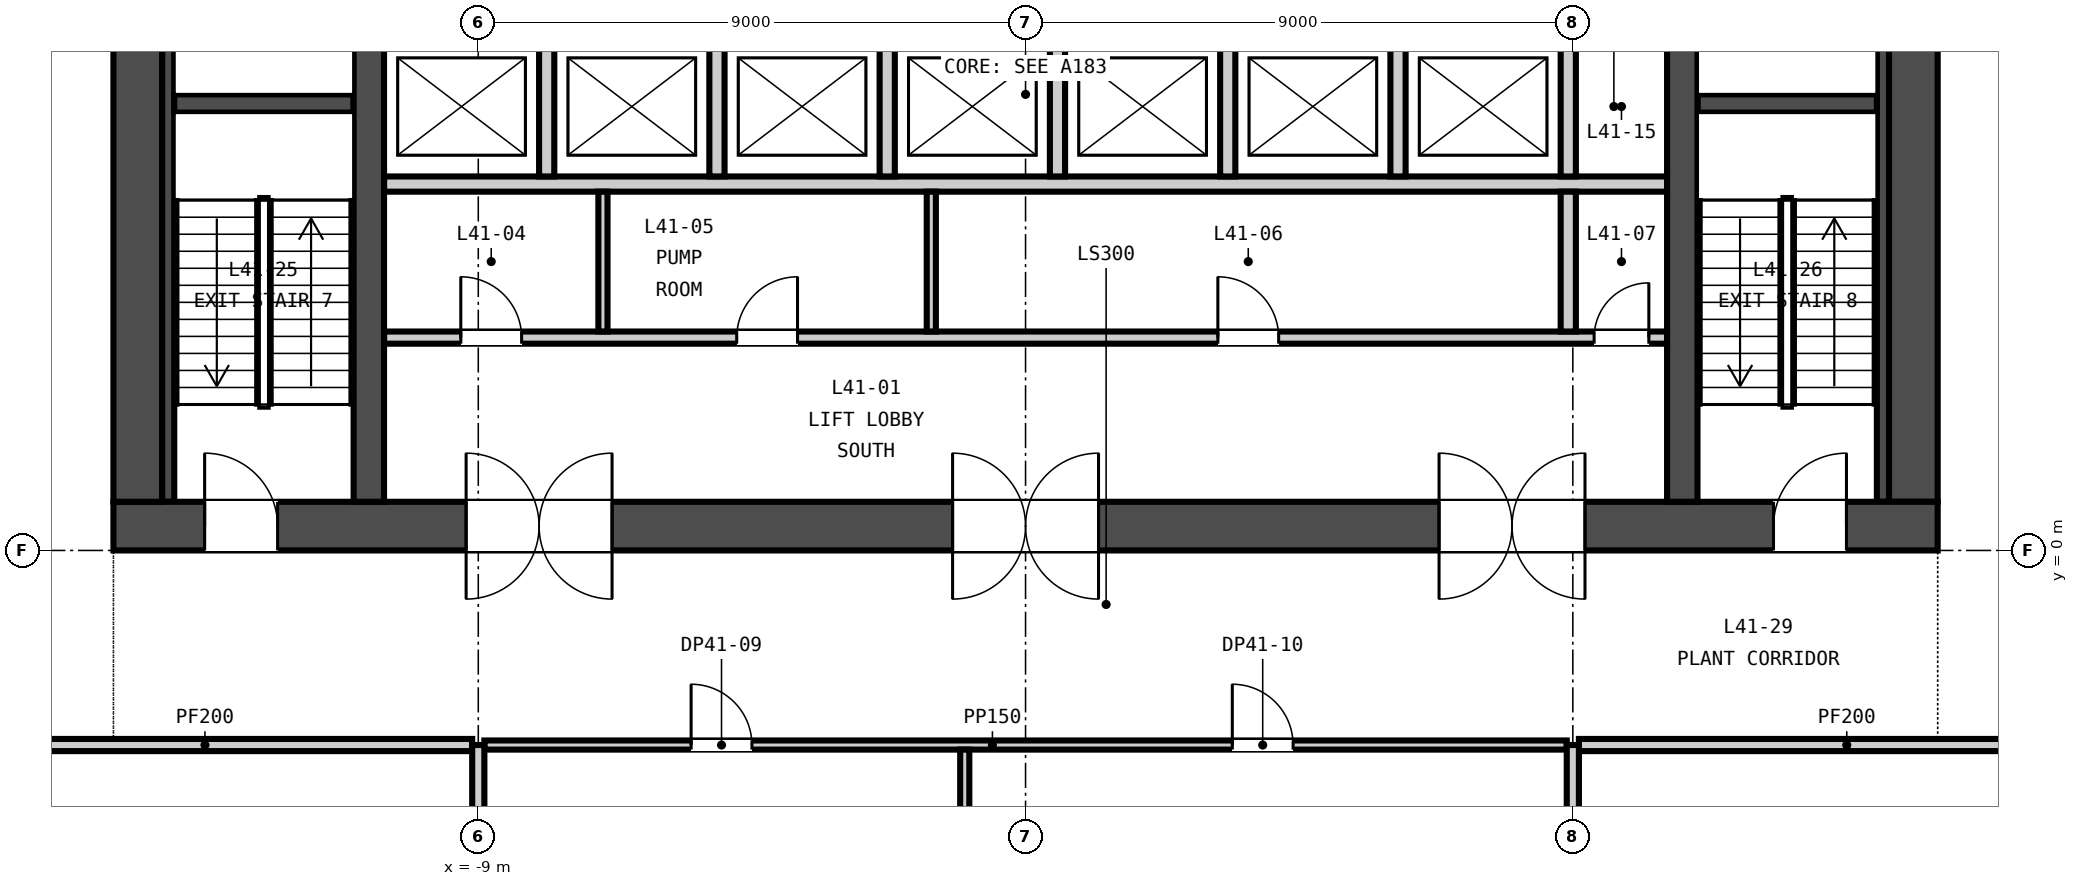
"""IFC4 building model, lengths in metres.
Left out: names, types, materials, properties, quantities, classifications, styles, units other than length and angle.
Written with IfcOpenShell. Run it as: python <this file> out.ifc"""

import sys

from ifc_helpers import new_model, si_unit, direction, frame, frame_2d, origin, place, context, subcontext, project, spatial, rectangle, extrude, element, fill, save


model = new_model("IFC4")
c1 = context("Model", 3, precision=1e-05, world=origin(), true_north=direction((0.0, 1.0)))
c2 = subcontext(c1, "Body", "Model", "MODEL_VIEW")
j1 = project(units=[si_unit("LENGTHUNIT", "METRE"), si_unit("PLANEANGLEUNIT", "RADIAN")], contexts=[c1])
p1 = place(None, origin())
s1 = spatial("IfcSite", under=j1, at=p1, CompositionType="ELEMENT")
p2 = place(p1, origin())
s2 = spatial("IfcBuilding", under=s1, at=p2, CompositionType="ELEMENT")
p3 = place(p2, frame((0.0, 0.0, 166.3)))
s3 = spatial("IfcBuildingStorey", under=s2, at=p3, CompositionType="ELEMENT", Elevation=166.3)
p4 = place(p3, frame((-15.0, 0.4, -0.3), z_axis=(0.0, 0.0, 1.0), x_axis=(1.0, 0.0, 0.0)))
e1 = element("IfcWall", 1, at=p4, inside=s3, PredefinedType="SOLIDWALL", context=c2, shape_type="SweptSolid", body=[
    extrude(rectangle(XDim=30.0, YDim=0.8, at=frame_2d((15.0, 0.0))), origin(), (0.0, 0.0, 1.0), 4.65),
])
p5 = place(p4, frame((5.8, 0.0, 0.3)))
e2 = element("IfcOpeningElement", 2, at=p5, cuts=e1, PredefinedType="OPENING", context=c2, shape_type="SweptSolid", body=[
    extrude(rectangle(XDim=2.4, YDim=2.4, at=frame_2d((1.2, 1.2))), frame((0.0, 0.41, 0.0), z_axis=(0.0, -1.0, 0.0), x_axis=(1.0, 0.0, 0.0)), (0.0, 0.0, 1.0), 0.82),
])
p6 = place(p4, frame((13.8, 0.0, 0.3)))
e3 = element("IfcOpeningElement", 3, at=p6, cuts=e1, PredefinedType="OPENING", context=c2, shape_type="SweptSolid", body=[
    extrude(rectangle(XDim=2.4, YDim=2.4, at=frame_2d((1.2, 1.2))), frame((0.0, 0.41, 0.0), z_axis=(0.0, -1.0, 0.0), x_axis=(1.0, 0.0, 0.0)), (0.0, 0.0, 1.0), 0.82),
])
p7 = place(p4, frame((21.8, 0.0, 0.3)))
e4 = element("IfcOpeningElement", 4, at=p7, cuts=e1, PredefinedType="OPENING", context=c2, shape_type="SweptSolid", body=[
    extrude(rectangle(XDim=2.4, YDim=2.4, at=frame_2d((1.2, 1.2))), frame((0.0, 0.41, 0.0), z_axis=(0.0, -1.0, 0.0), x_axis=(1.0, 0.0, 0.0)), (0.0, 0.0, 1.0), 0.82),
])
p8 = place(p4, frame((1.5, 0.0, 0.3)))
e5 = element("IfcOpeningElement", 5, at=p8, cuts=e1, PredefinedType="OPENING", context=c2, shape_type="SweptSolid", body=[
    extrude(rectangle(XDim=1.2, YDim=2.1, at=frame_2d((0.6, 1.05))), frame((0.0, 0.41, 0.0), z_axis=(0.0, -1.0, 0.0), x_axis=(1.0, 0.0, 0.0)), (0.0, 0.0, 1.0), 0.82),
])
p9 = place(p4, frame((27.3, 0.0, 0.3)))
e6 = element("IfcOpeningElement", 6, at=p9, cuts=e1, PredefinedType="OPENING", context=c2, shape_type="SweptSolid", body=[
    extrude(rectangle(XDim=1.2, YDim=2.1, at=frame_2d((0.6, 1.05))), frame((0.0, 0.41, 0.0), z_axis=(0.0, -1.0, 0.0), x_axis=(1.0, 0.0, 0.0)), (0.0, 0.0, 1.0), 0.82),
])
for number, where, z_axis, x_axis in (
    (7, (-14.6, 0.8, -0.3), (0.0, 0.0, 1.0), (0.0, 1.0, 0.0)),
    (8, (14.6, 0.8, -0.3), (0.0, 0.0, 1.0), (0.0, 1.0, 0.0)),
):
    element("IfcWall", number, at=place(p3, frame(where, z_axis=z_axis, x_axis=x_axis)), inside=s3, PredefinedType="SOLIDWALL", context=c2, shape_type="SweptSolid", body=[
        extrude(rectangle(XDim=13.4, YDim=0.8, at=frame_2d((6.7, 0.0))), origin(), (0.0, 0.0, 1.0), 4.65),
    ])
for number, where, z_axis, x_axis in (
    (9, (-10.8, 0.8, -0.3), (0.0, 0.0, 1.0), (0.0, 1.0, 0.0)),
    (10, (10.8, 0.8, -0.3), (0.0, 0.0, 1.0), (0.0, 1.0, 0.0)),
):
    element("IfcWall", number, at=place(p3, frame(where, z_axis=z_axis, x_axis=x_axis)), inside=s3, PredefinedType="SOLIDWALL", context=c2, shape_type="SweptSolid", body=[
        extrude(rectangle(XDim=13.4, YDim=0.5, at=frame_2d((6.7, 0.0))), origin(), (0.0, 0.0, 1.0), 4.65),
    ])
p10 = place(p3, frame((-10.55, 3.5, 0.0), z_axis=(0.0, 0.0, 1.0), x_axis=(1.0, 0.0, 0.0)))
e11 = element("IfcWall", 11, at=p10, inside=s3, PredefinedType="PARTITIONING", context=c2, shape_type="SweptSolid", body=[
    extrude(rectangle(XDim=21.1, YDim=0.2, at=frame_2d((10.55, 0.0))), origin(), (0.0, 0.0, 1.0), 4.35),
])
p11 = place(p10, frame((1.262, 0.0, 0.0)))
e12 = element("IfcOpeningElement", 12, at=p11, cuts=e11, PredefinedType="OPENING", context=c2, shape_type="SweptSolid", body=[
    extrude(rectangle(XDim=1.0, YDim=2.1, at=frame_2d((0.5, 1.05))), frame((0.0, 0.11, 0.0), z_axis=(0.0, -1.0, 0.0), x_axis=(1.0, 0.0, 0.0)), (0.0, 0.0, 1.0), 0.22),
])
p12 = place(p10, frame((5.8, 0.0, 0.0)))
e13 = element("IfcOpeningElement", 13, at=p12, cuts=e11, PredefinedType="OPENING", context=c2, shape_type="SweptSolid", body=[
    extrude(rectangle(XDim=1.0, YDim=2.1, at=frame_2d((0.5, 1.05))), frame((0.0, 0.11, 0.0), z_axis=(0.0, -1.0, 0.0), x_axis=(1.0, 0.0, 0.0)), (0.0, 0.0, 1.0), 0.22),
])
p13 = place(p10, frame((13.712, 0.0, 0.0)))
e14 = element("IfcOpeningElement", 14, at=p13, cuts=e11, PredefinedType="OPENING", context=c2, shape_type="SweptSolid", body=[
    extrude(rectangle(XDim=1.0, YDim=2.1, at=frame_2d((0.5, 1.05))), frame((0.0, 0.11, 0.0), z_axis=(0.0, -1.0, 0.0), x_axis=(1.0, 0.0, 0.0)), (0.0, 0.0, 1.0), 0.22),
])
p14 = place(p10, frame((19.9, 0.0, 0.0)))
e15 = element("IfcOpeningElement", 15, at=p14, cuts=e11, PredefinedType="OPENING", context=c2, shape_type="SweptSolid", body=[
    extrude(rectangle(XDim=0.9, YDim=2.1, at=frame_2d((0.45, 1.05))), frame((0.0, 0.11, 0.0), z_axis=(0.0, -1.0, 0.0), x_axis=(1.0, 0.0, 0.0)), (0.0, 0.0, 1.0), 0.22),
])
p15 = place(p3, frame((-10.55, 6.025, 0.0), z_axis=(0.0, 0.0, 1.0), x_axis=(1.0, 0.0, 0.0)))
e16 = element("IfcWall", 16, at=p15, inside=s3, PredefinedType="PARTITIONING", context=c2, shape_type="SweptSolid", body=[
    extrude(rectangle(XDim=21.1, YDim=0.25, at=frame_2d((10.55, 0.0))), origin(), (0.0, 0.0, 1.0), 4.35),
])
for number, where, z_axis, x_axis in (
    (17, (-6.95, 3.6, 0.0), (0.0, 0.0, 1.0), (0.0, 1.0, 0.0)),
    (18, (-1.55, 3.6, 0.0), (0.0, 0.0, 1.0), (0.0, 1.0, 0.0)),
):
    element("IfcWall", number, at=place(p3, frame(where, z_axis=z_axis, x_axis=x_axis)), inside=s3, PredefinedType="PARTITIONING", context=c2, shape_type="SweptSolid", body=[
        extrude(rectangle(XDim=2.3, YDim=0.15, at=frame_2d((1.15, 0.0))), origin(), (0.0, 0.0, 1.0), 4.35),
    ])
p16 = place(p3, frame((8.925, 3.6, 0.0), z_axis=(0.0, 0.0, 1.0), x_axis=(0.0, 1.0, 0.0)))
e19 = element("IfcWall", 19, at=p16, inside=s3, PredefinedType="PARTITIONING", context=c2, shape_type="SweptSolid", body=[
    extrude(rectangle(XDim=2.3, YDim=0.25, at=frame_2d((1.15, 0.0))), origin(), (0.0, 0.0, 1.0), 4.35),
])
for number, where, z_axis, x_axis in (
    (20, (-7.875, 6.15, 0.0), (0.0, 0.0, 1.0), (0.0, 1.0, 0.0)),
    (21, (-5.075, 6.15, 0.0), (0.0, 0.0, 1.0), (0.0, 1.0, 0.0)),
    (22, (-2.275, 6.15, 0.0), (0.0, 0.0, 1.0), (0.0, 1.0, 0.0)),
    (23, (0.525, 6.15, 0.0), (0.0, 0.0, 1.0), (0.0, 1.0, 0.0)),
    (24, (3.325, 6.15, 0.0), (0.0, 0.0, 1.0), (0.0, 1.0, 0.0)),
    (25, (6.125, 6.15, 0.0), (0.0, 0.0, 1.0), (0.0, 1.0, 0.0)),
    (26, (8.925, 6.15, 0.0), (0.0, 0.0, 1.0), (0.0, 1.0, 0.0)),
):
    element("IfcWall", number, at=place(p3, frame(where, z_axis=z_axis, x_axis=x_axis)), inside=s3, PredefinedType="PARTITIONING", context=c2, shape_type="SweptSolid", body=[
        extrude(rectangle(XDim=2.3, YDim=0.25, at=frame_2d((1.15, 0.0))), origin(), (0.0, 0.0, 1.0), 4.35),
    ])
p17 = place(p3, frame((-14.0, 7.35, 0.0), z_axis=(0.0, 0.0, 1.0), x_axis=(1.0, 0.0, 0.0)))
e27 = element("IfcWall", 27, at=p17, inside=s3, PredefinedType="SOLIDWALL", context=c2, shape_type="SweptSolid", body=[
    extrude(rectangle(XDim=2.95, YDim=0.3, at=frame_2d((1.475, 0.0))), origin(), (0.0, 0.0, 1.0), 4.35),
])
p18 = place(p3, frame((-14.1, 0.8, 0.0), z_axis=(0.0, 0.0, 1.0), x_axis=(0.0, 1.0, 0.0)))
e28 = element("IfcWall", 28, at=p18, inside=s3, PredefinedType="SOLIDWALL", context=c2, shape_type="SweptSolid", body=[
    extrude(rectangle(XDim=13.4, YDim=0.2, at=frame_2d((6.7, 0.0))), origin(), (0.0, 0.0, 1.0), 4.35),
])
p19 = place(p3, frame((11.05, 7.35, 0.0), z_axis=(0.0, 0.0, 1.0), x_axis=(1.0, 0.0, 0.0)))
e29 = element("IfcWall", 29, at=p19, inside=s3, PredefinedType="SOLIDWALL", context=c2, shape_type="SweptSolid", body=[
    extrude(rectangle(XDim=2.95, YDim=0.3, at=frame_2d((1.475, 0.0))), origin(), (0.0, 0.0, 1.0), 4.35),
])
p20 = place(p3, frame((14.1, 0.8, 0.0), z_axis=(0.0, 0.0, 1.0), x_axis=(0.0, 1.0, 0.0)))
e30 = element("IfcWall", 30, at=p20, inside=s3, PredefinedType="SOLIDWALL", context=c2, shape_type="SweptSolid", body=[
    extrude(rectangle(XDim=13.4, YDim=0.2, at=frame_2d((6.7, 0.0))), origin(), (0.0, 0.0, 1.0), 4.35),
])
p21 = place(p3, frame((-17.9, -3.2, 0.0), z_axis=(0.0, 0.0, 1.0), x_axis=(1.0, 0.0, 0.0)))
e31 = element("IfcWall", 31, at=p21, inside=s3, PredefinedType="PARTITIONING", context=c2, shape_type="SweptSolid", body=[
    extrude(rectangle(XDim=8.8, YDim=0.2, at=frame_2d((4.4, 0.0))), origin(), (0.0, 0.0, 1.0), 4.35),
])
p22 = place(p3, frame((-8.9, -3.2, 0.0), z_axis=(0.0, 0.0, 1.0), x_axis=(1.0, 0.0, 0.0)))
e32 = element("IfcWall", 32, at=p22, inside=s3, PredefinedType="PARTITIONING", context=c2, shape_type="SweptSolid", body=[
    extrude(rectangle(XDim=17.8, YDim=0.15, at=frame_2d((8.9, 0.0))), origin(), (0.0, 0.0, 1.0), 4.35),
])
p23 = place(p22, frame((3.4, 0.0, 0.0)))
e33 = element("IfcOpeningElement", 33, at=p23, cuts=e32, PredefinedType="OPENING", context=c2, shape_type="SweptSolid", body=[
    extrude(rectangle(XDim=1.0, YDim=2.1, at=frame_2d((0.5, 1.05))), frame((0.0, 0.085, 0.0), z_axis=(0.0, -1.0, 0.0), x_axis=(1.0, 0.0, 0.0)), (0.0, 0.0, 1.0), 0.17),
])
p24 = place(p22, frame((12.3, 0.0, 0.0)))
e34 = element("IfcOpeningElement", 34, at=p24, cuts=e32, PredefinedType="OPENING", context=c2, shape_type="SweptSolid", body=[
    extrude(rectangle(XDim=1.0, YDim=2.1, at=frame_2d((0.5, 1.05))), frame((0.0, 0.085, 0.0), z_axis=(0.0, -1.0, 0.0), x_axis=(1.0, 0.0, 0.0)), (0.0, 0.0, 1.0), 0.17),
])
p25 = place(p3, frame((9.1, -3.2, 0.0), z_axis=(0.0, 0.0, 1.0), x_axis=(1.0, 0.0, 0.0)))
e35 = element("IfcWall", 35, at=p25, inside=s3, PredefinedType="PARTITIONING", context=c2, shape_type="SweptSolid", body=[
    extrude(rectangle(XDim=8.8, YDim=0.2, at=frame_2d((4.4, 0.0))), origin(), (0.0, 0.0, 1.0), 4.35),
])
p26 = place(p3, frame((-9.0, -9.0, 0.0), z_axis=(0.0, 0.0, 1.0), x_axis=(0.0, 1.0, 0.0)))
e36 = element("IfcWall", 36, at=p26, inside=s3, PredefinedType="PARTITIONING", context=c2, shape_type="SweptSolid", body=[
    extrude(rectangle(XDim=5.8, YDim=0.2, at=frame_2d((2.9, 0.0))), origin(), (0.0, 0.0, 1.0), 4.35),
])
p27 = place(p3, frame((-1.0, -9.0, 0.0), z_axis=(0.0, 0.0, 1.0), x_axis=(0.0, 1.0, 0.0)))
e37 = element("IfcWall", 37, at=p27, inside=s3, PredefinedType="PARTITIONING", context=c2, shape_type="SweptSolid", body=[
    extrude(rectangle(XDim=5.725, YDim=0.15, at=frame_2d((2.863, 0.0))), origin(), (0.0, 0.0, 1.0), 4.35),
])
p28 = place(p3, frame((9.0, -9.0, 0.0), z_axis=(0.0, 0.0, 1.0), x_axis=(0.0, 1.0, 0.0)))
e38 = element("IfcWall", 38, at=p28, inside=s3, PredefinedType="PARTITIONING", context=c2, shape_type="SweptSolid", body=[
    extrude(rectangle(XDim=5.8, YDim=0.2, at=frame_2d((2.9, 0.0))), origin(), (0.0, 0.0, 1.0), 4.35),
])
p29 = place(p11, origin())
e39 = element("IfcDoor", 39, at=p29, inside=s3, OperationType="SINGLE_SWING_LEFT", PredefinedType="DOOR", context=c2, shape_type="SweptSolid", body=[
    extrude(rectangle(XDim=1.0, YDim=2.1, at=frame_2d((0.5, 1.05))), frame((0.0, 0.025, 0.0), z_axis=(0.0, -1.0, 0.0), x_axis=(1.0, 0.0, 0.0)), (0.0, 0.0, 1.0), 0.05),
])
fill(e12, e39)
p30 = place(p12, origin())
e40 = element("IfcDoor", 40, at=p30, inside=s3, OperationType="SINGLE_SWING_RIGHT", PredefinedType="DOOR", context=c2, shape_type="SweptSolid", body=[
    extrude(rectangle(XDim=1.0, YDim=2.1, at=frame_2d((0.5, 1.05))), frame((0.0, 0.025, 0.0), z_axis=(0.0, -1.0, 0.0), x_axis=(1.0, 0.0, 0.0)), (0.0, 0.0, 1.0), 0.05),
])
fill(e13, e40)
p31 = place(p13, origin())
e41 = element("IfcDoor", 41, at=p31, inside=s3, OperationType="SINGLE_SWING_LEFT", PredefinedType="DOOR", context=c2, shape_type="SweptSolid", body=[
    extrude(rectangle(XDim=1.0, YDim=2.1, at=frame_2d((0.5, 1.05))), frame((0.0, 0.025, 0.0), z_axis=(0.0, -1.0, 0.0), x_axis=(1.0, 0.0, 0.0)), (0.0, 0.0, 1.0), 0.05),
])
fill(e14, e41)
p32 = place(p14, origin())
e42 = element("IfcDoor", 42, at=p32, inside=s3, OperationType="SINGLE_SWING_RIGHT", PredefinedType="DOOR", context=c2, shape_type="SweptSolid", body=[
    extrude(rectangle(XDim=0.9, YDim=2.1, at=frame_2d((0.45, 1.05))), frame((0.0, 0.025, 0.0), z_axis=(0.0, -1.0, 0.0), x_axis=(1.0, 0.0, 0.0)), (0.0, 0.0, 1.0), 0.05),
])
fill(e15, e42)
p33 = place(p5, origin())
e43 = element("IfcDoor", 43, at=p33, inside=s3, OperationType="DOUBLE_DOOR_DOUBLE_SWING", PredefinedType="DOOR", context=c2, shape_type="SweptSolid", body=[
    extrude(rectangle(XDim=2.4, YDim=2.4, at=frame_2d((1.2, 1.2))), frame((0.0, 0.025, 0.0), z_axis=(0.0, -1.0, 0.0), x_axis=(1.0, 0.0, 0.0)), (0.0, 0.0, 1.0), 0.05),
])
fill(e2, e43)
p34 = place(p6, origin())
e44 = element("IfcDoor", 44, at=p34, inside=s3, OperationType="DOUBLE_DOOR_DOUBLE_SWING", PredefinedType="DOOR", context=c2, shape_type="SweptSolid", body=[
    extrude(rectangle(XDim=2.4, YDim=2.4, at=frame_2d((1.2, 1.2))), frame((0.0, 0.025, 0.0), z_axis=(0.0, -1.0, 0.0), x_axis=(1.0, 0.0, 0.0)), (0.0, 0.0, 1.0), 0.05),
])
fill(e3, e44)
p35 = place(p7, origin())
e45 = element("IfcDoor", 45, at=p35, inside=s3, OperationType="DOUBLE_DOOR_DOUBLE_SWING", PredefinedType="DOOR", context=c2, shape_type="SweptSolid", body=[
    extrude(rectangle(XDim=2.4, YDim=2.4, at=frame_2d((1.2, 1.2))), frame((0.0, 0.025, 0.0), z_axis=(0.0, -1.0, 0.0), x_axis=(1.0, 0.0, 0.0)), (0.0, 0.0, 1.0), 0.05),
])
fill(e4, e45)
p36 = place(p8, origin())
e46 = element("IfcDoor", 46, at=p36, inside=s3, OperationType="SINGLE_SWING_LEFT", PredefinedType="DOOR", context=c2, shape_type="SweptSolid", body=[
    extrude(rectangle(XDim=1.2, YDim=2.1, at=frame_2d((0.6, 1.05))), frame((0.0, 0.025, 0.0), z_axis=(0.0, -1.0, 0.0), x_axis=(1.0, 0.0, 0.0)), (0.0, 0.0, 1.0), 0.05),
])
fill(e5, e46)
p37 = place(p9, origin())
e47 = element("IfcDoor", 47, at=p37, inside=s3, OperationType="SINGLE_SWING_RIGHT", PredefinedType="DOOR", context=c2, shape_type="SweptSolid", body=[
    extrude(rectangle(XDim=1.2, YDim=2.1, at=frame_2d((0.6, 1.05))), frame((0.0, 0.025, 0.0), z_axis=(0.0, -1.0, 0.0), x_axis=(1.0, 0.0, 0.0)), (0.0, 0.0, 1.0), 0.05),
])
fill(e6, e47)
p38 = place(p23, origin())
e48 = element("IfcDoor", 48, at=p38, inside=s3, OperationType="SINGLE_SWING_LEFT", PredefinedType="DOOR", context=c2, shape_type="SweptSolid", body=[
    extrude(rectangle(XDim=1.0, YDim=2.1, at=frame_2d((0.5, 1.05))), frame((0.0, 0.025, 0.0), z_axis=(0.0, -1.0, 0.0), x_axis=(1.0, 0.0, 0.0)), (0.0, 0.0, 1.0), 0.05),
])
fill(e33, e48)
p39 = place(p24, origin())
e49 = element("IfcDoor", 49, at=p39, inside=s3, OperationType="SINGLE_SWING_LEFT", PredefinedType="DOOR", context=c2, shape_type="SweptSolid", body=[
    extrude(rectangle(XDim=1.0, YDim=2.1, at=frame_2d((0.5, 1.05))), frame((0.0, 0.025, 0.0), z_axis=(0.0, -1.0, 0.0), x_axis=(1.0, 0.0, 0.0)), (0.0, 0.0, 1.0), 0.05),
])
fill(e34, e49)
save(model, sys.argv[1])
